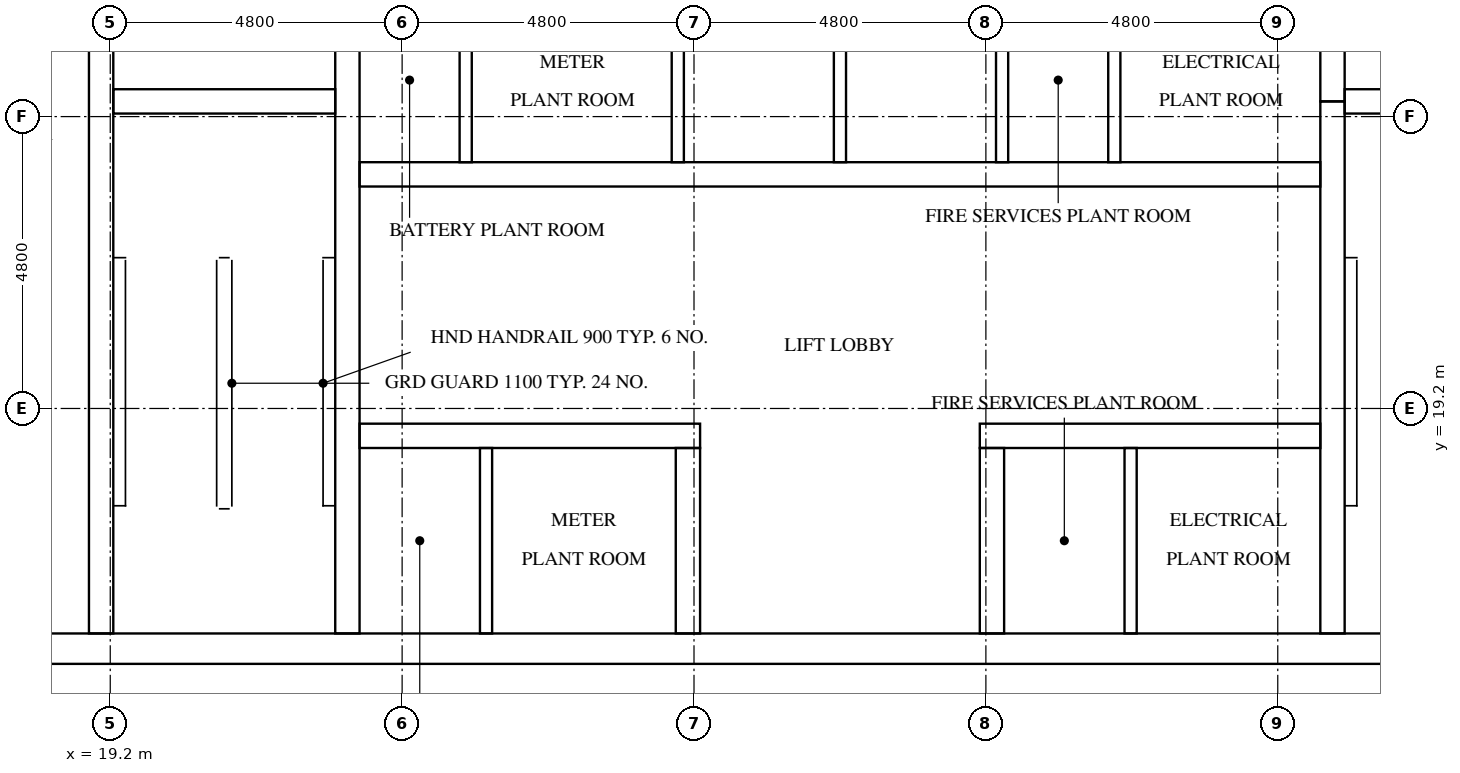
"""IFC4 building model, lengths in metres.
Left out: names, types, materials, properties, quantities, classifications, styles, units other than length and angle.
Written with IfcOpenShell. Run it as: python <this file> out.ifc"""

import sys

from ifc_helpers import new_model, si_unit, direction, frame, frame_2d, origin, place, context, subcontext, project, spatial, rectangle, extrude, element, fill, save


model = new_model("IFC4")
c1 = context("Model", 3, precision=1e-05, world=origin(), true_north=direction((0.0, 1.0)))
c2 = subcontext(c1, "Body", "Model", "MODEL_VIEW")
j1 = project(units=[si_unit("LENGTHUNIT", "METRE"), si_unit("PLANEANGLEUNIT", "RADIAN")], contexts=[c1])
p1 = place(None, origin())
s1 = spatial("IfcSite", under=j1, at=p1, CompositionType="ELEMENT")
p2 = place(p1, origin())
s2 = spatial("IfcBuilding", under=s1, at=p2, CompositionType="ELEMENT")
p3 = place(p2, frame((0.0, 0.0, 291.5)))
s3 = spatial("IfcBuildingStorey", under=s2, at=p3, CompositionType="ELEMENT", Elevation=291.5)
p4 = place(p3, frame((15.0, 15.25, 0.0), z_axis=(0.0, 0.0, 1.0), x_axis=(1.0, 0.0, 0.0)))
e1 = element("IfcWall", 1, at=p4, inside=s3, PredefinedType="SHEAR", context=c2, shape_type="SweptSolid", body=[
    extrude(rectangle(XDim=32.4, YDim=0.5, at=frame_2d((16.2, 0.0))), origin(), (0.0, 0.0, 1.0), 4.4),
])
p5 = place(p4, frame((15.3, 0.0, 0.0)))
e2 = element("IfcOpeningElement", 2, at=p5, cuts=e1, PredefinedType="OPENING", context=c2, shape_type="SweptSolid", body=[
    extrude(rectangle(XDim=1.8, YDim=2.1, at=frame_2d((0.9, 1.05))), frame((0.0, 0.26, 0.0), z_axis=(0.0, -1.0, 0.0), x_axis=(1.0, 0.0, 0.0)), (0.0, 0.0, 1.0), 0.52),
])
p6 = place(p3, frame((19.05, 15.5, 0.0), z_axis=(0.0, 0.0, 1.0), x_axis=(0.0, 1.0, 0.0)))
e3 = element("IfcWall", 3, at=p6, inside=s3, PredefinedType="SHEAR", context=c2, shape_type="SweptSolid", body=[
    extrude(rectangle(XDim=15.55, YDim=0.4, at=frame_2d((7.775, 0.0))), origin(), (0.0, 0.0, 1.0), 4.4),
])
p7 = place(p6, frame((9.95, 0.0, 0.0)))
e4 = element("IfcOpeningElement", 4, at=p7, cuts=e3, PredefinedType="OPENING", context=c2, shape_type="SweptSolid", body=[
    extrude(rectangle(XDim=1.1, YDim=2.1, at=frame_2d((0.55, 1.05))), frame((0.0, 0.21, 0.0), z_axis=(0.0, -1.0, 0.0), x_axis=(1.0, 0.0, 0.0)), (0.0, 0.0, 1.0), 0.42),
])
p8 = place(p6, frame((13.45, 0.0, 0.0)))
e5 = element("IfcOpeningElement", 5, at=p8, cuts=e3, PredefinedType="OPENING", context=c2, shape_type="SweptSolid", body=[
    extrude(rectangle(XDim=1.1, YDim=2.1, at=frame_2d((0.55, 1.05))), frame((0.0, 0.21, 0.0), z_axis=(0.0, -1.0, 0.0), x_axis=(1.0, 0.0, 0.0)), (0.0, 0.0, 1.0), 0.42),
])
p9 = place(p6, frame((0.7, 0.0, 0.0)))
e6 = element("IfcOpeningElement", 6, at=p9, cuts=e3, PredefinedType="OPENING", context=c2, shape_type="SweptSolid", body=[
    extrude(rectangle(XDim=1.2, YDim=2.1, at=frame_2d((0.6, 1.05))), frame((0.0, 0.21, 0.0), z_axis=(0.0, -1.0, 0.0), x_axis=(1.0, 0.0, 0.0)), (0.0, 0.0, 1.0), 0.42),
])
p10 = place(p3, frame((23.1, 15.5, 0.0), z_axis=(0.0, 0.0, 1.0), x_axis=(0.0, 1.0, 0.0)))
e7 = element("IfcWall", 7, at=p10, inside=s3, PredefinedType="SHEAR", context=c2, shape_type="SweptSolid", body=[
    extrude(rectangle(XDim=21.8, YDim=0.4, at=frame_2d((10.9, 0.0))), origin(), (0.0, 0.0, 1.0), 4.4),
])
p11 = place(p3, frame((39.3, 15.5, 0.0), z_axis=(0.0, 0.0, 1.0), x_axis=(0.0, 1.0, 0.0)))
e8 = element("IfcWall", 8, at=p11, inside=s3, PredefinedType="SHEAR", context=c2, shape_type="SweptSolid", body=[
    extrude(rectangle(XDim=8.75, YDim=0.4, at=frame_2d((4.375, 0.0))), origin(), (0.0, 0.0, 1.0), 4.4),
])
p12 = place(p3, frame((39.3, 24.25, 0.0), z_axis=(0.0, 0.0, 1.0), x_axis=(0.0, 1.0, 0.0)))
e9 = element("IfcWall", 9, at=p12, inside=s3, PredefinedType="SHEAR", context=c2, shape_type="SweptSolid", body=[
    extrude(rectangle(XDim=3.5, YDim=0.4, at=frame_2d((1.75, 0.0))), origin(), (0.0, 0.0, 1.0), 4.4),
])
for number, where, z_axis, x_axis in (
    (10, (19.25, 24.25, 0.0), (0.0, 0.0, 1.0), (1.0, 0.0, 0.0)),
    (11, (39.5, 24.25, 0.0), (0.0, 0.0, 1.0), (1.0, 0.0, 0.0)),
):
    element("IfcWall", number, at=place(p3, frame(where, z_axis=z_axis, x_axis=x_axis)), inside=s3, PredefinedType="SHEAR", context=c2, shape_type="SweptSolid", body=[
        extrude(rectangle(XDim=3.65, YDim=0.4, at=frame_2d((1.825, 0.0))), origin(), (0.0, 0.0, 1.0), 4.4),
    ])
p13 = place(p3, frame((23.3, 18.75, 0.0), z_axis=(0.0, 0.0, 1.0), x_axis=(1.0, 0.0, 0.0)))
e12 = element("IfcWall", 12, at=p13, inside=s3, PredefinedType="SHEAR", context=c2, shape_type="SweptSolid", body=[
    extrude(rectangle(XDim=5.6, YDim=0.4, at=frame_2d((2.8, 0.0))), origin(), (0.0, 0.0, 1.0), 4.4),
])
p14 = place(p13, frame((0.49, 0.0, 0.0)))
e13 = element("IfcOpeningElement", 13, at=p14, cuts=e12, PredefinedType="OPENING", context=c2, shape_type="SweptSolid", body=[
    extrude(rectangle(XDim=1.0, YDim=2.1, at=frame_2d((0.5, 1.05))), frame((0.0, 0.21, 0.0), z_axis=(0.0, -1.0, 0.0), x_axis=(1.0, 0.0, 0.0)), (0.0, 0.0, 1.0), 0.42),
])
p15 = place(p13, frame((3.19, 0.0, 0.0)))
e14 = element("IfcOpeningElement", 14, at=p15, cuts=e12, PredefinedType="OPENING", context=c2, shape_type="SweptSolid", body=[
    extrude(rectangle(XDim=1.0, YDim=2.1, at=frame_2d((0.5, 1.05))), frame((0.0, 0.21, 0.0), z_axis=(0.0, -1.0, 0.0), x_axis=(1.0, 0.0, 0.0)), (0.0, 0.0, 1.0), 0.42),
])
p16 = place(p3, frame((33.5, 18.75, 0.0), z_axis=(0.0, 0.0, 1.0), x_axis=(1.0, 0.0, 0.0)))
e15 = element("IfcWall", 15, at=p16, inside=s3, PredefinedType="SHEAR", context=c2, shape_type="SweptSolid", body=[
    extrude(rectangle(XDim=5.6, YDim=0.4, at=frame_2d((2.8, 0.0))), origin(), (0.0, 0.0, 1.0), 4.4),
])
p17 = place(p16, frame((0.89, 0.0, 0.0)))
e16 = element("IfcOpeningElement", 16, at=p17, cuts=e15, PredefinedType="OPENING", context=c2, shape_type="SweptSolid", body=[
    extrude(rectangle(XDim=1.0, YDim=2.1, at=frame_2d((0.5, 1.05))), frame((0.0, 0.21, 0.0), z_axis=(0.0, -1.0, 0.0), x_axis=(1.0, 0.0, 0.0)), (0.0, 0.0, 1.0), 0.42),
])
p18 = place(p16, frame((3.59, 0.0, 0.0)))
e17 = element("IfcOpeningElement", 17, at=p18, cuts=e15, PredefinedType="OPENING", context=c2, shape_type="SweptSolid", body=[
    extrude(rectangle(XDim=1.0, YDim=2.1, at=frame_2d((0.5, 1.05))), frame((0.0, 0.21, 0.0), z_axis=(0.0, -1.0, 0.0), x_axis=(1.0, 0.0, 0.0)), (0.0, 0.0, 1.0), 0.42),
])
p19 = place(p3, frame((23.3, 23.05, 0.0), z_axis=(0.0, 0.0, 1.0), x_axis=(1.0, 0.0, 0.0)))
e18 = element("IfcWall", 18, at=p19, inside=s3, PredefinedType="SHEAR", context=c2, shape_type="SweptSolid", body=[
    extrude(rectangle(XDim=15.8, YDim=0.4, at=frame_2d((7.9, 0.0))), origin(), (0.0, 0.0, 1.0), 4.4),
])
p20 = place(p19, frame((6.017, 0.0, 0.0)))
e19 = element("IfcOpeningElement", 19, at=p20, cuts=e18, PredefinedType="OPENING", context=c2, shape_type="SweptSolid", body=[
    extrude(rectangle(XDim=1.1, YDim=2.1, at=frame_2d((0.55, 1.05))), frame((0.0, 0.21, 0.0), z_axis=(0.0, -1.0, 0.0), x_axis=(1.0, 0.0, 0.0)), (0.0, 0.0, 1.0), 0.42),
])
p21 = place(p19, frame((8.683, 0.0, 0.0)))
e20 = element("IfcOpeningElement", 20, at=p21, cuts=e18, PredefinedType="OPENING", context=c2, shape_type="SweptSolid", body=[
    extrude(rectangle(XDim=1.1, YDim=2.1, at=frame_2d((0.55, 1.05))), frame((0.0, 0.21, 0.0), z_axis=(0.0, -1.0, 0.0), x_axis=(1.0, 0.0, 0.0)), (0.0, 0.0, 1.0), 0.42),
])
p22 = place(p19, frame((0.323, 0.0, 0.0)))
e21 = element("IfcOpeningElement", 21, at=p22, cuts=e18, PredefinedType="OPENING", context=c2, shape_type="SweptSolid", body=[
    extrude(rectangle(XDim=1.0, YDim=2.1, at=frame_2d((0.5, 1.05))), frame((0.0, 0.21, 0.0), z_axis=(0.0, -1.0, 0.0), x_axis=(1.0, 0.0, 0.0)), (0.0, 0.0, 1.0), 0.42),
])
p23 = place(p19, frame((2.989, 0.0, 0.0)))
e22 = element("IfcOpeningElement", 22, at=p23, cuts=e18, PredefinedType="OPENING", context=c2, shape_type="SweptSolid", body=[
    extrude(rectangle(XDim=1.0, YDim=2.1, at=frame_2d((0.5, 1.05))), frame((0.0, 0.21, 0.0), z_axis=(0.0, -1.0, 0.0), x_axis=(1.0, 0.0, 0.0)), (0.0, 0.0, 1.0), 0.42),
])
p24 = place(p19, frame((10.989, 0.0, 0.0)))
e23 = element("IfcOpeningElement", 23, at=p24, cuts=e18, PredefinedType="OPENING", context=c2, shape_type="SweptSolid", body=[
    extrude(rectangle(XDim=1.0, YDim=2.1, at=frame_2d((0.5, 1.05))), frame((0.0, 0.21, 0.0), z_axis=(0.0, -1.0, 0.0), x_axis=(1.0, 0.0, 0.0)), (0.0, 0.0, 1.0), 0.42),
])
p25 = place(p19, frame((13.656, 0.0, 0.0)))
e24 = element("IfcOpeningElement", 24, at=p25, cuts=e18, PredefinedType="OPENING", context=c2, shape_type="SweptSolid", body=[
    extrude(rectangle(XDim=1.0, YDim=2.1, at=frame_2d((0.5, 1.05))), frame((0.0, 0.21, 0.0), z_axis=(0.0, -1.0, 0.0), x_axis=(1.0, 0.0, 0.0)), (0.0, 0.0, 1.0), 0.42),
])
for number, where, z_axis, x_axis in (
    (25, (28.7, 15.5, 0.0), (0.0, 0.0, 1.0), (0.0, 1.0, 0.0)),
    (26, (33.7, 15.5, 0.0), (0.0, 0.0, 1.0), (0.0, 1.0, 0.0)),
):
    element("IfcWall", number, at=place(p3, frame(where, z_axis=z_axis, x_axis=x_axis)), inside=s3, PredefinedType="SHEAR", context=c2, shape_type="SweptSolid", body=[
        extrude(rectangle(XDim=3.05, YDim=0.4, at=frame_2d((1.525, 0.0))), origin(), (0.0, 0.0, 1.0), 4.4),
    ])
for number, where, z_axis, x_axis in (
    (27, (28.533, 23.25, 0.0), (0.0, 0.0, 1.0), (0.0, 1.0, 0.0)),
    (28, (31.2, 23.25, 0.0), (0.0, 0.0, 1.0), (0.0, 1.0, 0.0)),
    (29, (33.867, 23.25, 0.0), (0.0, 0.0, 1.0), (0.0, 1.0, 0.0)),
):
    element("IfcWall", number, at=place(p3, frame(where, z_axis=z_axis, x_axis=x_axis)), inside=s3, PredefinedType="SOLIDWALL", context=c2, shape_type="SweptSolid", body=[
        extrude(rectangle(XDim=2.7, YDim=0.2, at=frame_2d((1.35, 0.0))), origin(), (0.0, 0.0, 1.0), 4.4),
    ])
for number, where, z_axis, x_axis in (
    (30, (25.045, 23.25, 0.0), (0.0, 0.0, 1.0), (0.0, 1.0, 0.0)),
    (31, (35.712, 23.25, 0.0), (0.0, 0.0, 1.0), (0.0, 1.0, 0.0)),
):
    element("IfcWall", number, at=place(p3, frame(where, z_axis=z_axis, x_axis=x_axis)), inside=s3, PredefinedType="PARTITIONING", context=c2, shape_type="SweptSolid", body=[
        extrude(rectangle(XDim=2.7, YDim=0.2, at=frame_2d((1.35, 0.0))), origin(), (0.0, 0.0, 1.0), 4.4),
    ])
for number, where, z_axis, x_axis in (
    (32, (25.38, 15.5, 0.0), (0.0, 0.0, 1.0), (0.0, 1.0, 0.0)),
    (33, (35.98, 15.5, 0.0), (0.0, 0.0, 1.0), (0.0, 1.0, 0.0)),
):
    element("IfcWall", number, at=place(p3, frame(where, z_axis=z_axis, x_axis=x_axis)), inside=s3, PredefinedType="PARTITIONING", context=c2, shape_type="SweptSolid", body=[
        extrude(rectangle(XDim=3.05, YDim=0.2, at=frame_2d((1.525, 0.0))), origin(), (0.0, 0.0, 1.0), 4.4),
    ])
p26 = place(p20, origin())
e34 = element("IfcDoor", 34, at=p26, inside=s3, OperationType="DOUBLE_DOOR_SLIDING", PredefinedType="DOOR", context=c2, shape_type="SweptSolid", body=[
    extrude(rectangle(XDim=1.1, YDim=2.1, at=frame_2d((0.55, 1.05))), frame((0.0, 0.025, 0.0), z_axis=(0.0, -1.0, 0.0), x_axis=(1.0, 0.0, 0.0)), (0.0, 0.0, 1.0), 0.05),
])
fill(e19, e34)
p27 = place(p21, origin())
e35 = element("IfcDoor", 35, at=p27, inside=s3, OperationType="DOUBLE_DOOR_SLIDING", PredefinedType="DOOR", context=c2, shape_type="SweptSolid", body=[
    extrude(rectangle(XDim=1.1, YDim=2.1, at=frame_2d((0.55, 1.05))), frame((0.0, 0.025, 0.0), z_axis=(0.0, -1.0, 0.0), x_axis=(1.0, 0.0, 0.0)), (0.0, 0.0, 1.0), 0.05),
])
fill(e20, e35)
p28 = place(p9, frame((1.2, 0.0, 0.0), z_axis=(0.0, 0.0, 1.0), x_axis=(-1.0, 0.0, 0.0)))
e36 = element("IfcDoor", 36, at=p28, inside=s3, OperationType="SINGLE_SWING_RIGHT", PredefinedType="DOOR", context=c2, shape_type="SweptSolid", body=[
    extrude(rectangle(XDim=1.2, YDim=2.1, at=frame_2d((0.6, 1.05))), frame((0.0, 0.025, 0.0), z_axis=(0.0, -1.0, 0.0), x_axis=(1.0, 0.0, 0.0)), (0.0, 0.0, 1.0), 0.05),
])
fill(e6, e36)
p29 = place(p5, frame((1.8, 0.0, 0.0), z_axis=(0.0, 0.0, 1.0), x_axis=(-1.0, 0.0, 0.0)))
e37 = element("IfcDoor", 37, at=p29, inside=s3, OperationType="DOUBLE_DOOR_SINGLE_SWING", PredefinedType="DOOR", context=c2, shape_type="SweptSolid", body=[
    extrude(rectangle(XDim=1.8, YDim=2.1, at=frame_2d((0.9, 1.05))), frame((0.0, 0.025, 0.0), z_axis=(0.0, -1.0, 0.0), x_axis=(1.0, 0.0, 0.0)), (0.0, 0.0, 1.0), 0.05),
])
fill(e2, e37)
p30 = place(p22, frame((1.0, 0.0, 0.0), z_axis=(0.0, 0.0, 1.0), x_axis=(-1.0, 0.0, 0.0)))
e38 = element("IfcDoor", 38, at=p30, inside=s3, OperationType="SINGLE_SWING_LEFT", PredefinedType="DOOR", context=c2, shape_type="SweptSolid", body=[
    extrude(rectangle(XDim=1.0, YDim=2.1, at=frame_2d((0.5, 1.05))), frame((0.0, 0.025, 0.0), z_axis=(0.0, -1.0, 0.0), x_axis=(1.0, 0.0, 0.0)), (0.0, 0.0, 1.0), 0.05),
])
fill(e21, e38)
p31 = place(p23, frame((1.0, 0.0, 0.0), z_axis=(0.0, 0.0, 1.0), x_axis=(-1.0, 0.0, 0.0)))
e39 = element("IfcDoor", 39, at=p31, inside=s3, OperationType="SINGLE_SWING_RIGHT", PredefinedType="DOOR", context=c2, shape_type="SweptSolid", body=[
    extrude(rectangle(XDim=1.0, YDim=2.1, at=frame_2d((0.5, 1.05))), frame((0.0, 0.025, 0.0), z_axis=(0.0, -1.0, 0.0), x_axis=(1.0, 0.0, 0.0)), (0.0, 0.0, 1.0), 0.05),
])
fill(e22, e39)
p32 = place(p24, frame((1.0, 0.0, 0.0), z_axis=(0.0, 0.0, 1.0), x_axis=(-1.0, 0.0, 0.0)))
e40 = element("IfcDoor", 40, at=p32, inside=s3, OperationType="SINGLE_SWING_LEFT", PredefinedType="DOOR", context=c2, shape_type="SweptSolid", body=[
    extrude(rectangle(XDim=1.0, YDim=2.1, at=frame_2d((0.5, 1.05))), frame((0.0, 0.025, 0.0), z_axis=(0.0, -1.0, 0.0), x_axis=(1.0, 0.0, 0.0)), (0.0, 0.0, 1.0), 0.05),
])
fill(e23, e40)
p33 = place(p25, frame((1.0, 0.0, 0.0), z_axis=(0.0, 0.0, 1.0), x_axis=(-1.0, 0.0, 0.0)))
e41 = element("IfcDoor", 41, at=p33, inside=s3, OperationType="SINGLE_SWING_RIGHT", PredefinedType="DOOR", context=c2, shape_type="SweptSolid", body=[
    extrude(rectangle(XDim=1.0, YDim=2.1, at=frame_2d((0.5, 1.05))), frame((0.0, 0.025, 0.0), z_axis=(0.0, -1.0, 0.0), x_axis=(1.0, 0.0, 0.0)), (0.0, 0.0, 1.0), 0.05),
])
fill(e24, e41)
p34 = place(p14, origin())
e42 = element("IfcDoor", 42, at=p34, inside=s3, OperationType="SINGLE_SWING_LEFT", PredefinedType="DOOR", context=c2, shape_type="SweptSolid", body=[
    extrude(rectangle(XDim=1.0, YDim=2.1, at=frame_2d((0.5, 1.05))), frame((0.0, 0.025, 0.0), z_axis=(0.0, -1.0, 0.0), x_axis=(1.0, 0.0, 0.0)), (0.0, 0.0, 1.0), 0.05),
])
fill(e13, e42)
p35 = place(p15, origin())
e43 = element("IfcDoor", 43, at=p35, inside=s3, OperationType="SINGLE_SWING_RIGHT", PredefinedType="DOOR", context=c2, shape_type="SweptSolid", body=[
    extrude(rectangle(XDim=1.0, YDim=2.1, at=frame_2d((0.5, 1.05))), frame((0.0, 0.025, 0.0), z_axis=(0.0, -1.0, 0.0), x_axis=(1.0, 0.0, 0.0)), (0.0, 0.0, 1.0), 0.05),
])
fill(e14, e43)
p36 = place(p17, origin())
e44 = element("IfcDoor", 44, at=p36, inside=s3, OperationType="SINGLE_SWING_LEFT", PredefinedType="DOOR", context=c2, shape_type="SweptSolid", body=[
    extrude(rectangle(XDim=1.0, YDim=2.1, at=frame_2d((0.5, 1.05))), frame((0.0, 0.025, 0.0), z_axis=(0.0, -1.0, 0.0), x_axis=(1.0, 0.0, 0.0)), (0.0, 0.0, 1.0), 0.05),
])
fill(e16, e44)
p37 = place(p18, origin())
e45 = element("IfcDoor", 45, at=p37, inside=s3, OperationType="SINGLE_SWING_RIGHT", PredefinedType="DOOR", context=c2, shape_type="SweptSolid", body=[
    extrude(rectangle(XDim=1.0, YDim=2.1, at=frame_2d((0.5, 1.05))), frame((0.0, 0.025, 0.0), z_axis=(0.0, -1.0, 0.0), x_axis=(1.0, 0.0, 0.0)), (0.0, 0.0, 1.0), 0.05),
])
fill(e17, e45)
save(model, sys.argv[1])
